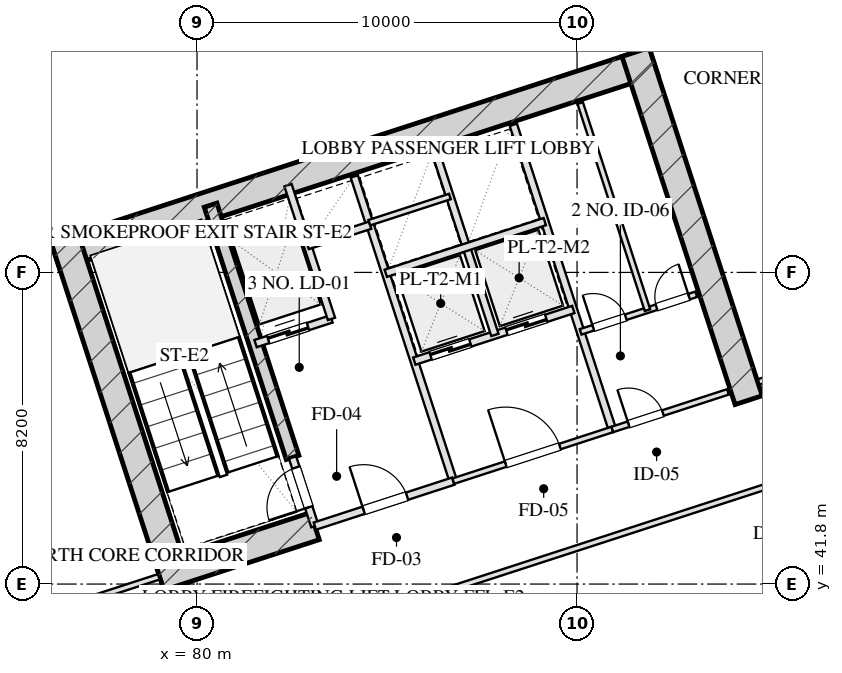
"""IFC4 building model, lengths in metres.
Left out: names, types, materials, properties, quantities, classifications, styles, units other than length and angle.
Written with IfcOpenShell. Run it as: python <this file> out.ifc"""

import sys

from ifc_helpers import new_model, si_unit, direction, frame, frame_2d, origin, place, context, subcontext, project, spatial, rectangle, extrude, element, fill, save


model = new_model("IFC4")
c1 = context("Model", 3, precision=1e-05, world=origin(), true_north=direction((0.0, 1.0)))
c2 = subcontext(c1, "Body", "Model", "MODEL_VIEW")
j1 = project(units=[si_unit("LENGTHUNIT", "METRE"), si_unit("PLANEANGLEUNIT", "RADIAN")], contexts=[c1])
p1 = place(None, origin())
s1 = spatial("IfcSite", under=j1, at=p1, CompositionType="ELEMENT")
p2 = place(p1, origin())
s2 = spatial("IfcBuilding", under=s1, at=p2, CompositionType="ELEMENT")
p3 = place(p2, frame((0.0, 0.0, 34.0)))
s3 = spatial("IfcBuildingStorey", under=s2, at=p3, CompositionType="ELEMENT", Elevation=34.0)
p4 = place(p3, frame((76.272, 50.443, 0.0), z_axis=(0.0, 0.0, 1.0), x_axis=(0.951056072937, 0.309018358888, 0.0)))
e1 = element("IfcWall", 1, at=p4, inside=s3, PredefinedType="SHEAR", context=c2, shape_type="SweptSolid", body=[
    extrude(rectangle(XDim=16.55, YDim=0.75, at=frame_2d((8.275, 0.0))), origin(), (0.0, 0.0, 1.0), 4.0),
])
for number, where, z_axis, x_axis in (
    (2, (79.489, 41.756, 0.0), (0.0, 0.0, 1.0), (-0.309, 0.951, 0.0)),
    (3, (94.515, 46.639, 0.0), (0.0, 0.0, 1.0), (-0.309, 0.951, 0.0)),
):
    element("IfcWall", number, at=place(p3, frame(where, z_axis=z_axis, x_axis=x_axis)), inside=s3, PredefinedType="SHEAR", context=c2, shape_type="SweptSolid", body=[
        extrude(rectangle(XDim=9.63, YDim=0.75, at=frame_2d((4.815, 0.0))), origin(), (0.0, 0.0, 1.0), 4.0),
    ])
p5 = place(p3, frame((82.514, 45.131, 0.0), z_axis=(0.0, 0.0, 1.0), x_axis=(-0.308988790936, 0.951065679686, 0.0)))
e4 = element("IfcWall", 4, at=p5, inside=s3, PredefinedType="SHEAR", context=c2, shape_type="SweptSolid", body=[
    extrude(rectangle(XDim=6.98, YDim=0.35, at=frame_2d((3.49, 0.0))), origin(), (0.0, 0.0, 1.0), 4.0),
])
p6 = place(p3, frame((79.016, 41.997, 0.0), z_axis=(0.0, 0.0, 1.0), x_axis=(0.95106038264, 0.309005094736, 0.0)))
e5 = element("IfcWall", 5, at=p6, inside=s3, PredefinedType="SHEAR", context=c2, shape_type="SweptSolid", body=[
    extrude(rectangle(XDim=4.295, YDim=0.75, at=frame_2d((2.147, 0.0))), origin(), (0.0, 0.0, 1.0), 4.0),
])
p7 = place(p3, frame((79.655, 4.352, 0.0), z_axis=(0.0, 0.0, 1.0), x_axis=(-0.309014526607, 0.951057318118, 0.0)))
e6 = element("IfcWall", 6, at=p7, inside=s3, PredefinedType="SOLIDWALL", context=c2, shape_type="SweptSolid", body=[
    extrude(rectangle(XDim=50.0, YDim=0.4, at=frame_2d((25.0, 0.0))), origin(), (0.0, 0.0, 1.0), 3.16),
])
p8 = place(p7, frame((17.35, 0.0, 0.75)))
e7 = element("IfcOpeningElement", 7, at=p8, cuts=e6, PredefinedType="OPENING", context=c2, shape_type="SweptSolid", body=[
    extrude(rectangle(XDim=2.5, YDim=1.75, at=frame_2d((1.25, 0.875))), frame((0.0, 0.21, 0.0), z_axis=(0.0, -1.0, 0.0), x_axis=(1.0, 0.0, 0.0)), (0.0, 0.0, 1.0), 0.42),
])
p9 = place(p7, frame((21.15, 0.0, 0.75)))
e8 = element("IfcOpeningElement", 8, at=p9, cuts=e6, PredefinedType="OPENING", context=c2, shape_type="SweptSolid", body=[
    extrude(rectangle(XDim=2.5, YDim=1.75, at=frame_2d((1.25, 0.875))), frame((0.0, 0.21, 0.0), z_axis=(0.0, -1.0, 0.0), x_axis=(1.0, 0.0, 0.0)), (0.0, 0.0, 1.0), 0.42),
])
p10 = place(p7, frame((27.38, 0.0, 0.0)))
e9 = element("IfcOpeningElement", 9, at=p10, cuts=e6, PredefinedType="OPENING", context=c2, shape_type="SweptSolid", body=[
    extrude(rectangle(XDim=1.1, YDim=2.15, at=frame_2d((0.55, 1.075))), frame((0.0, 0.21, 0.0), z_axis=(0.0, -1.0, 0.0), x_axis=(1.0, 0.0, 0.0)), (0.0, 0.0, 1.0), 0.42),
])
p11 = place(p3, frame((66.002, 55.433, 0.0), z_axis=(0.0, 0.0, 1.0), x_axis=(0.951055939317, 0.309018770125, 0.0)))
e10 = element("IfcWall", 10, at=p11, inside=s3, PredefinedType="SOLIDWALL", context=c2, shape_type="SweptSolid", body=[
    extrude(rectangle(XDim=32.4, YDim=0.4, at=frame_2d((16.2, 0.0))), origin(), (0.0, 0.0, 1.0), 3.16),
])
p12 = place(p3, frame((83.101, 43.324, 0.0), z_axis=(0.0, 0.0, 1.0), x_axis=(-0.309048298632, 0.951046344356, 0.0)))
e11 = element("IfcWall", 11, at=p12, inside=s3, PredefinedType="PARTITIONING", context=c2, shape_type="SweptSolid", body=[
    extrude(rectangle(XDim=1.9, YDim=0.2, at=frame_2d((0.95, 0.0))), origin(), (0.0, 0.0, 1.0), 3.725),
])
p13 = place(p12, frame((0.52, 0.0, 0.0)))
e12 = element("IfcOpeningElement", 12, at=p13, cuts=e11, PredefinedType="OPENING", context=c2, shape_type="SweptSolid", body=[
    extrude(rectangle(XDim=1.1, YDim=2.05, at=frame_2d((0.55, 1.025))), frame((0.0, 0.11, 0.0), z_axis=(0.0, -1.0, 0.0), x_axis=(1.0, 0.0, 0.0)), (0.0, 0.0, 1.0), 0.22),
])
p14 = place(p3, frame((86.743, 44.508, 0.0), z_axis=(0.0, 0.0, 1.0), x_axis=(-0.309016001439, 0.951056838919, 0.0)))
e13 = element("IfcWall", 13, at=p14, inside=s3, PredefinedType="PARTITIONING", context=c2, shape_type="SweptSolid", body=[
    extrude(rectangle(XDim=8.43, YDim=0.2, at=frame_2d((4.215, 0.0))), origin(), (0.0, 0.0, 1.0), 3.725),
])
p15 = place(p3, frame((83.101, 43.324, 0.0), z_axis=(0.0, 0.0, 1.0), x_axis=(0.951052804469, 0.309028417967, 0.0)))
e14 = element("IfcWall", 14, at=p15, inside=s3, PredefinedType="PARTITIONING", context=c2, shape_type="SweptSolid", body=[
    extrude(rectangle(XDim=3.83, YDim=0.2, at=frame_2d((1.915, 0.0))), origin(), (0.0, 0.0, 1.0), 3.725),
])
p16 = place(p15, frame((1.35, 0.0, 0.0)))
e15 = element("IfcOpeningElement", 15, at=p16, cuts=e14, PredefinedType="OPENING", context=c2, shape_type="SweptSolid", body=[
    extrude(rectangle(XDim=1.2, YDim=2.05, at=frame_2d((0.6, 1.025))), frame((0.0, 0.11, 0.0), z_axis=(0.0, -1.0, 0.0), x_axis=(1.0, 0.0, 0.0)), (0.0, 0.0, 1.0), 0.22),
])
p17 = place(p3, frame((81.54, 48.127, 0.0), z_axis=(0.0, 0.0, 1.0), x_axis=(0.951062257173, 0.308999325213, 0.0)))
e16 = element("IfcWall", 16, at=p17, inside=s3, PredefinedType="PARTITIONING", context=c2, shape_type="SweptSolid", body=[
    extrude(rectangle(XDim=2.1, YDim=0.2, at=frame_2d((1.05, 0.0))), origin(), (0.0, 0.0, 1.0), 3.725),
])
p18 = place(p17, frame((0.35, 0.0, 0.0)))
e17 = element("IfcOpeningElement", 17, at=p18, cuts=e16, PredefinedType="OPENING", context=c2, shape_type="SweptSolid", body=[
    extrude(rectangle(XDim=1.1, YDim=2.05, at=frame_2d((0.55, 1.025))), frame((0.0, 0.11, 0.0), z_axis=(0.0, -1.0, 0.0), x_axis=(1.0, 0.0, 0.0)), (0.0, 0.0, 1.0), 0.22),
])
p19 = place(p3, frame((83.538, 48.776, 0.0), z_axis=(0.0, 0.0, 1.0), x_axis=(-0.3089935693, 0.951064127245, 0.0)))
e18 = element("IfcWall", 18, at=p19, inside=s3, PredefinedType="PARTITIONING", context=c2, shape_type="SweptSolid", body=[
    extrude(rectangle(XDim=3.7, YDim=0.2, at=frame_2d((1.85, 0.0))), origin(), (0.0, 0.0, 1.0), 3.725),
])
p20 = place(p3, frame((82.91, 50.707, 0.0), z_axis=(0.0, 0.0, 1.0), x_axis=(0.951041328149, 0.309063734775, 0.0)))
e19 = element("IfcWall", 19, at=p20, inside=s3, PredefinedType="PARTITIONING", context=c2, shape_type="SweptSolid", body=[
    extrude(rectangle(XDim=1.73, YDim=0.2, at=frame_2d((0.865, 0.0))), origin(), (0.0, 0.0, 1.0), 3.725),
])
p21 = place(p3, frame((90.928, 45.868, 0.0), z_axis=(0.0, 0.0, 1.0), x_axis=(-0.309042196757, 0.951048327176, 0.0)))
e20 = element("IfcWall", 20, at=p21, inside=s3, PredefinedType="PARTITIONING", context=c2, shape_type="SweptSolid", body=[
    extrude(rectangle(XDim=8.43, YDim=0.2, at=frame_2d((4.215, 0.0))), origin(), (0.0, 0.0, 1.0), 3.725),
])
p22 = place(p3, frame((86.743, 44.508, 0.0), z_axis=(0.0, 0.0, 1.0), x_axis=(0.951063829732, 0.308994485023, 0.0)))
e21 = element("IfcWall", 21, at=p22, inside=s3, PredefinedType="PARTITIONING", context=c2, shape_type="SweptSolid", body=[
    extrude(rectangle(XDim=4.4, YDim=0.15, at=frame_2d((2.2, 0.0))), origin(), (0.0, 0.0, 1.0), 3.725),
])
p23 = place(p22, frame((1.45, 0.0, 0.0)))
e22 = element("IfcOpeningElement", 22, at=p23, cuts=e21, PredefinedType="OPENING", context=c2, shape_type="SweptSolid", body=[
    extrude(rectangle(XDim=1.5, YDim=2.05, at=frame_2d((0.75, 1.025))), frame((0.0, 0.085, 0.0), z_axis=(0.0, -1.0, 0.0), x_axis=(1.0, 0.0, 0.0)), (0.0, 0.0, 1.0), 0.17),
])
p24 = place(p3, frame((85.718, 47.666, 0.0), z_axis=(0.0, 0.0, 1.0), x_axis=(0.951058531764, 0.30901079133, 0.0)))
e23 = element("IfcWall", 23, at=p24, inside=s3, PredefinedType="PARTITIONING", context=c2, shape_type="SweptSolid", body=[
    extrude(rectangle(XDim=4.4, YDim=0.2, at=frame_2d((2.2, 0.0))), origin(), (0.0, 0.0, 1.0), 3.725),
])
p25 = place(p24, frame((0.45, 0.0, 0.0)))
e24 = element("IfcOpeningElement", 24, at=p25, cuts=e23, PredefinedType="OPENING", context=c2, shape_type="SweptSolid", body=[
    extrude(rectangle(XDim=1.1, YDim=2.05, at=frame_2d((0.55, 1.025))), frame((0.0, 0.11, 0.0), z_axis=(0.0, -1.0, 0.0), x_axis=(1.0, 0.0, 0.0)), (0.0, 0.0, 1.0), 0.22),
])
p26 = place(p24, frame((2.55, 0.0, 0.0)))
e25 = element("IfcOpeningElement", 25, at=p26, cuts=e23, PredefinedType="OPENING", context=c2, shape_type="SweptSolid", body=[
    extrude(rectangle(XDim=1.1, YDim=2.05, at=frame_2d((0.55, 1.025))), frame((0.0, 0.11, 0.0), z_axis=(0.0, -1.0, 0.0), x_axis=(1.0, 0.0, 0.0)), (0.0, 0.0, 1.0), 0.22),
])
p27 = place(p3, frame((87.838, 48.354, 0.0), z_axis=(0.0, 0.0, 1.0), x_axis=(-0.3090093719, 0.951058992953, 0.0)))
e26 = element("IfcWall", 26, at=p27, inside=s3, PredefinedType="PARTITIONING", context=c2, shape_type="SweptSolid", body=[
    extrude(rectangle(XDim=5.11, YDim=0.2, at=frame_2d((2.555, 0.0))), origin(), (0.0, 0.0, 1.0), 3.725),
])
p28 = place(p3, frame((84.967, 49.977, 0.0), z_axis=(0.0, 0.0, 1.0), x_axis=(0.951063829732, 0.308994485023, 0.0)))
e27 = element("IfcWall", 27, at=p28, inside=s3, PredefinedType="PARTITIONING", context=c2, shape_type="SweptSolid", body=[
    extrude(rectangle(XDim=4.4, YDim=0.2, at=frame_2d((2.2, 0.0))), origin(), (0.0, 0.0, 1.0), 3.725),
])
p29 = place(p3, frame((84.534, 51.308, 0.0), z_axis=(0.0, 0.0, 1.0), x_axis=(0.951075093106, 0.308959814982, 0.0)))
e28 = element("IfcWall", 28, at=p29, inside=s3, PredefinedType="PARTITIONING", context=c2, shape_type="SweptSolid", body=[
    extrude(rectangle(XDim=2.23, YDim=0.15, at=frame_2d((1.115, 0.0))), origin(), (0.0, 0.0, 1.0), 3.725),
])
p30 = place(p3, frame((90.928, 45.868, 0.0), z_axis=(0.0, 0.0, 1.0), x_axis=(0.951059297078, 0.309008435874, 0.0)))
e29 = element("IfcWall", 29, at=p30, inside=s3, PredefinedType="PARTITIONING", context=c2, shape_type="SweptSolid", body=[
    extrude(rectangle(XDim=3.2, YDim=0.15, at=frame_2d((1.6, 0.0))), origin(), (0.0, 0.0, 1.0), 3.725),
])
p31 = place(p30, frame((0.45, 0.0, 0.0)))
e30 = element("IfcOpeningElement", 30, at=p31, cuts=e29, PredefinedType="OPENING", context=c2, shape_type="SweptSolid", body=[
    extrude(rectangle(XDim=0.95, YDim=2.05, at=frame_2d((0.475, 1.025))), frame((0.0, 0.085, 0.0), z_axis=(0.0, -1.0, 0.0), x_axis=(1.0, 0.0, 0.0)), (0.0, 0.0, 1.0), 0.17),
])
p32 = place(p3, frame((90.094, 48.436, 0.0), z_axis=(0.0, 0.0, 1.0), x_axis=(0.951066581729, 0.308986014439, 0.0)))
e31 = element("IfcWall", 31, at=p32, inside=s3, PredefinedType="PARTITIONING", context=c2, shape_type="SweptSolid", body=[
    extrude(rectangle(XDim=3.2, YDim=0.15, at=frame_2d((1.6, 0.0))), origin(), (0.0, 0.0, 1.0), 3.725),
])
p33 = place(p32, frame((0.35, 0.0, 0.0)))
e32 = element("IfcOpeningElement", 32, at=p33, cuts=e31, PredefinedType="OPENING", context=c2, shape_type="SweptSolid", body=[
    extrude(rectangle(XDim=0.9, YDim=2.05, at=frame_2d((0.45, 1.025))), frame((0.0, 0.085, 0.0), z_axis=(0.0, -1.0, 0.0), x_axis=(1.0, 0.0, 0.0)), (0.0, 0.0, 1.0), 0.17),
])
p34 = place(p32, frame((2.1, 0.0, 0.0)))
e33 = element("IfcOpeningElement", 33, at=p34, cuts=e31, PredefinedType="OPENING", context=c2, shape_type="SweptSolid", body=[
    extrude(rectangle(XDim=0.9, YDim=2.05, at=frame_2d((0.45, 1.025))), frame((0.0, 0.085, 0.0), z_axis=(0.0, -1.0, 0.0), x_axis=(1.0, 0.0, 0.0)), (0.0, 0.0, 1.0), 0.17),
])
p35 = place(p3, frame((91.853, 49.007, 0.0), z_axis=(0.0, 0.0, 1.0), x_axis=(-0.309022487551, 0.951054731437, 0.0)))
e34 = element("IfcWall", 34, at=p35, inside=s3, PredefinedType="PARTITIONING", context=c2, shape_type="SweptSolid", body=[
    extrude(rectangle(XDim=5.73, YDim=0.15, at=frame_2d((2.865, 0.0))), origin(), (0.0, 0.0, 1.0), 3.725),
])
p36 = place(p3, frame((68.721, 38.652, 0.0), z_axis=(0.0, 0.0, 1.0), x_axis=(0.951056658866, 0.309016555588, 0.0)))
e35 = element("IfcWall", 35, at=p36, inside=s3, PredefinedType="PARTITIONING", context=c2, shape_type="SweptSolid", body=[
    extrude(rectangle(XDim=10.8, YDim=0.15, at=frame_2d((5.4, 0.0))), origin(), (0.0, 0.0, 1.0), 3.725),
])
p37 = place(p36, frame((4.536, 0.0, 0.0)))
e36 = element("IfcOpeningElement", 36, at=p37, cuts=e35, PredefinedType="OPENING", context=c2, shape_type="SweptSolid", body=[
    extrude(rectangle(XDim=1.0, YDim=2.05, at=frame_2d((0.5, 1.025))), frame((0.0, 0.085, 0.0), z_axis=(0.0, -1.0, 0.0), x_axis=(1.0, 0.0, 0.0)), (0.0, 0.0, 1.0), 0.17),
])
p38 = place(p3, frame((94.78, 47.119, 0.0), z_axis=(0.0, 0.0, 1.0), x_axis=(0.951054294345, 0.309023832749, 0.0)))
e37 = element("IfcWall", 37, at=p38, inside=s3, PredefinedType="PARTITIONING", context=c2, shape_type="SweptSolid", body=[
    extrude(rectangle(XDim=10.2, YDim=0.15, at=frame_2d((5.1, 0.0))), origin(), (0.0, 0.0, 1.0), 3.725),
])
p39 = place(p38, frame((4.284, 0.0, 0.0)))
e38 = element("IfcOpeningElement", 38, at=p39, cuts=e37, PredefinedType="OPENING", context=c2, shape_type="SweptSolid", body=[
    extrude(rectangle(XDim=1.0, YDim=2.05, at=frame_2d((0.5, 1.025))), frame((0.0, 0.085, 0.0), z_axis=(0.0, -1.0, 0.0), x_axis=(1.0, 0.0, 0.0)), (0.0, 0.0, 1.0), 0.17),
])
p40 = place(p3, frame((86.692, 41.673, 0.0), z_axis=(0.0, 0.0, 1.0), x_axis=(0.951055605195, 0.309019798438, 0.0)))
e39 = element("IfcWall", 39, at=p40, inside=s3, PredefinedType="PARTITIONING", context=c2, shape_type="SweptSolid", body=[
    extrude(rectangle(XDim=19.575, YDim=0.15, at=frame_2d((9.788, 0.0))), origin(), (0.0, 0.0, 1.0), 3.725),
])
p41 = place(p3, frame((91.834, 25.848, 0.0), z_axis=(0.0, 0.0, 1.0), x_axis=(-0.30901773025, 0.951056277195, 0.0)))
e40 = element("IfcWall", 40, at=p41, inside=s3, PredefinedType="PARTITIONING", context=c2, shape_type="SweptSolid", body=[
    extrude(rectangle(XDim=16.64, YDim=0.15, at=frame_2d((8.32, 0.0))), origin(), (0.0, 0.0, 1.0), 3.725),
])
p42 = place(p41, frame((1.663, 0.0, 0.0)))
e41 = element("IfcOpeningElement", 41, at=p42, cuts=e40, PredefinedType="OPENING", context=c2, shape_type="SweptSolid", body=[
    extrude(rectangle(XDim=1.0, YDim=2.05, at=frame_2d((0.5, 1.025))), frame((0.0, 0.085, 0.0), z_axis=(0.0, -1.0, 0.0), x_axis=(1.0, 0.0, 0.0)), (0.0, 0.0, 1.0), 0.17),
])
p43 = place(p41, frame((6.156, 0.0, 0.0)))
e42 = element("IfcOpeningElement", 42, at=p43, cuts=e40, PredefinedType="OPENING", context=c2, shape_type="SweptSolid", body=[
    extrude(rectangle(XDim=1.0, YDim=2.05, at=frame_2d((0.5, 1.025))), frame((0.0, 0.085, 0.0), z_axis=(0.0, -1.0, 0.0), x_axis=(1.0, 0.0, 0.0)), (0.0, 0.0, 1.0), 0.17),
])
p44 = place(p41, frame((10.649, 0.0, 0.0)))
e43 = element("IfcOpeningElement", 43, at=p44, cuts=e40, PredefinedType="OPENING", context=c2, shape_type="SweptSolid", body=[
    extrude(rectangle(XDim=0.85, YDim=2.05, at=frame_2d((0.425, 1.025))), frame((0.0, 0.085, 0.0), z_axis=(0.0, -1.0, 0.0), x_axis=(1.0, 0.0, 0.0)), (0.0, 0.0, 1.0), 0.17),
])
p45 = place(p41, frame((14.476, 0.0, 0.0)))
e44 = element("IfcOpeningElement", 44, at=p45, cuts=e40, PredefinedType="OPENING", context=c2, shape_type="SweptSolid", body=[
    extrude(rectangle(XDim=1.0, YDim=2.05, at=frame_2d((0.5, 1.025))), frame((0.0, 0.085, 0.0), z_axis=(0.0, -1.0, 0.0), x_axis=(1.0, 0.0, 0.0)), (0.0, 0.0, 1.0), 0.17),
])
p46 = place(p3, frame((87.72, 38.508, 0.0), z_axis=(0.0, 0.0, 1.0), x_axis=(0.951059270613, 0.309008517326, 0.0)))
e45 = element("IfcWall", 45, at=p46, inside=s3, PredefinedType="PARTITIONING", context=c2, shape_type="SweptSolid", body=[
    extrude(rectangle(XDim=19.575, YDim=0.15, at=frame_2d((9.788, 0.0))), origin(), (0.0, 0.0, 1.0), 3.725),
])
p47 = place(p13, origin())
e46 = element("IfcDoor", 46, at=p47, inside=s3, OperationType="SINGLE_SWING_LEFT", PredefinedType="DOOR", context=c2, shape_type="SweptSolid", body=[
    extrude(rectangle(XDim=1.1, YDim=2.05, at=frame_2d((0.55, 1.025))), frame((0.0, 0.025, 0.0), z_axis=(0.0, -1.0, 0.0), x_axis=(1.0, 0.0, 0.0)), (0.0, 0.0, 1.0), 0.05),
])
fill(e12, e46)
p48 = place(p16, origin())
e47 = element("IfcDoor", 47, at=p48, inside=s3, OperationType="SINGLE_SWING_LEFT", PredefinedType="DOOR", context=c2, shape_type="SweptSolid", body=[
    extrude(rectangle(XDim=1.2, YDim=2.05, at=frame_2d((0.6, 1.025))), frame((0.0, 0.025, 0.0), z_axis=(0.0, -1.0, 0.0), x_axis=(1.0, 0.0, 0.0)), (0.0, 0.0, 1.0), 0.05),
])
fill(e15, e47)
p49 = place(p18, origin())
e48 = element("IfcDoor", 48, at=p49, inside=s3, OperationType="DOUBLE_DOOR_SLIDING", PredefinedType="DOOR", context=c2, shape_type="SweptSolid", body=[
    extrude(rectangle(XDim=1.1, YDim=2.05, at=frame_2d((0.55, 1.025))), frame((0.0, 0.025, 0.0), z_axis=(0.0, -1.0, 0.0), x_axis=(1.0, 0.0, 0.0)), (0.0, 0.0, 1.0), 0.05),
])
fill(e17, e48)
p50 = place(p23, origin())
e49 = element("IfcDoor", 49, at=p50, inside=s3, OperationType="SINGLE_SWING_LEFT", PredefinedType="DOOR", context=c2, shape_type="SweptSolid", body=[
    extrude(rectangle(XDim=1.5, YDim=2.05, at=frame_2d((0.75, 1.025))), frame((0.0, 0.025, 0.0), z_axis=(0.0, -1.0, 0.0), x_axis=(1.0, 0.0, 0.0)), (0.0, 0.0, 1.0), 0.05),
])
fill(e22, e49)
p51 = place(p25, origin())
e50 = element("IfcDoor", 50, at=p51, inside=s3, OperationType="DOUBLE_DOOR_SLIDING", PredefinedType="DOOR", context=c2, shape_type="SweptSolid", body=[
    extrude(rectangle(XDim=1.1, YDim=2.05, at=frame_2d((0.55, 1.025))), frame((0.0, 0.025, 0.0), z_axis=(0.0, -1.0, 0.0), x_axis=(1.0, 0.0, 0.0)), (0.0, 0.0, 1.0), 0.05),
])
fill(e24, e50)
p52 = place(p26, origin())
e51 = element("IfcDoor", 51, at=p52, inside=s3, OperationType="DOUBLE_DOOR_SLIDING", PredefinedType="DOOR", context=c2, shape_type="SweptSolid", body=[
    extrude(rectangle(XDim=1.1, YDim=2.05, at=frame_2d((0.55, 1.025))), frame((0.0, 0.025, 0.0), z_axis=(0.0, -1.0, 0.0), x_axis=(1.0, 0.0, 0.0)), (0.0, 0.0, 1.0), 0.05),
])
fill(e25, e51)
p53 = place(p31, origin())
e52 = element("IfcDoor", 52, at=p53, inside=s3, OperationType="SINGLE_SWING_LEFT", PredefinedType="DOOR", context=c2, shape_type="SweptSolid", body=[
    extrude(rectangle(XDim=0.95, YDim=2.05, at=frame_2d((0.475, 1.025))), frame((0.0, 0.025, 0.0), z_axis=(0.0, -1.0, 0.0), x_axis=(1.0, 0.0, 0.0)), (0.0, 0.0, 1.0), 0.05),
])
fill(e30, e52)
p54 = place(p33, origin())
e53 = element("IfcDoor", 53, at=p54, inside=s3, OperationType="SINGLE_SWING_LEFT", PredefinedType="DOOR", context=c2, shape_type="SweptSolid", body=[
    extrude(rectangle(XDim=0.9, YDim=2.05, at=frame_2d((0.45, 1.025))), frame((0.0, 0.025, 0.0), z_axis=(0.0, -1.0, 0.0), x_axis=(1.0, 0.0, 0.0)), (0.0, 0.0, 1.0), 0.05),
])
fill(e32, e53)
p55 = place(p34, origin())
e54 = element("IfcDoor", 54, at=p55, inside=s3, OperationType="SINGLE_SWING_RIGHT", PredefinedType="DOOR", context=c2, shape_type="SweptSolid", body=[
    extrude(rectangle(XDim=0.9, YDim=2.05, at=frame_2d((0.45, 1.025))), frame((0.0, 0.025, 0.0), z_axis=(0.0, -1.0, 0.0), x_axis=(1.0, 0.0, 0.0)), (0.0, 0.0, 1.0), 0.05),
])
fill(e33, e54)
save(model, sys.argv[1])
